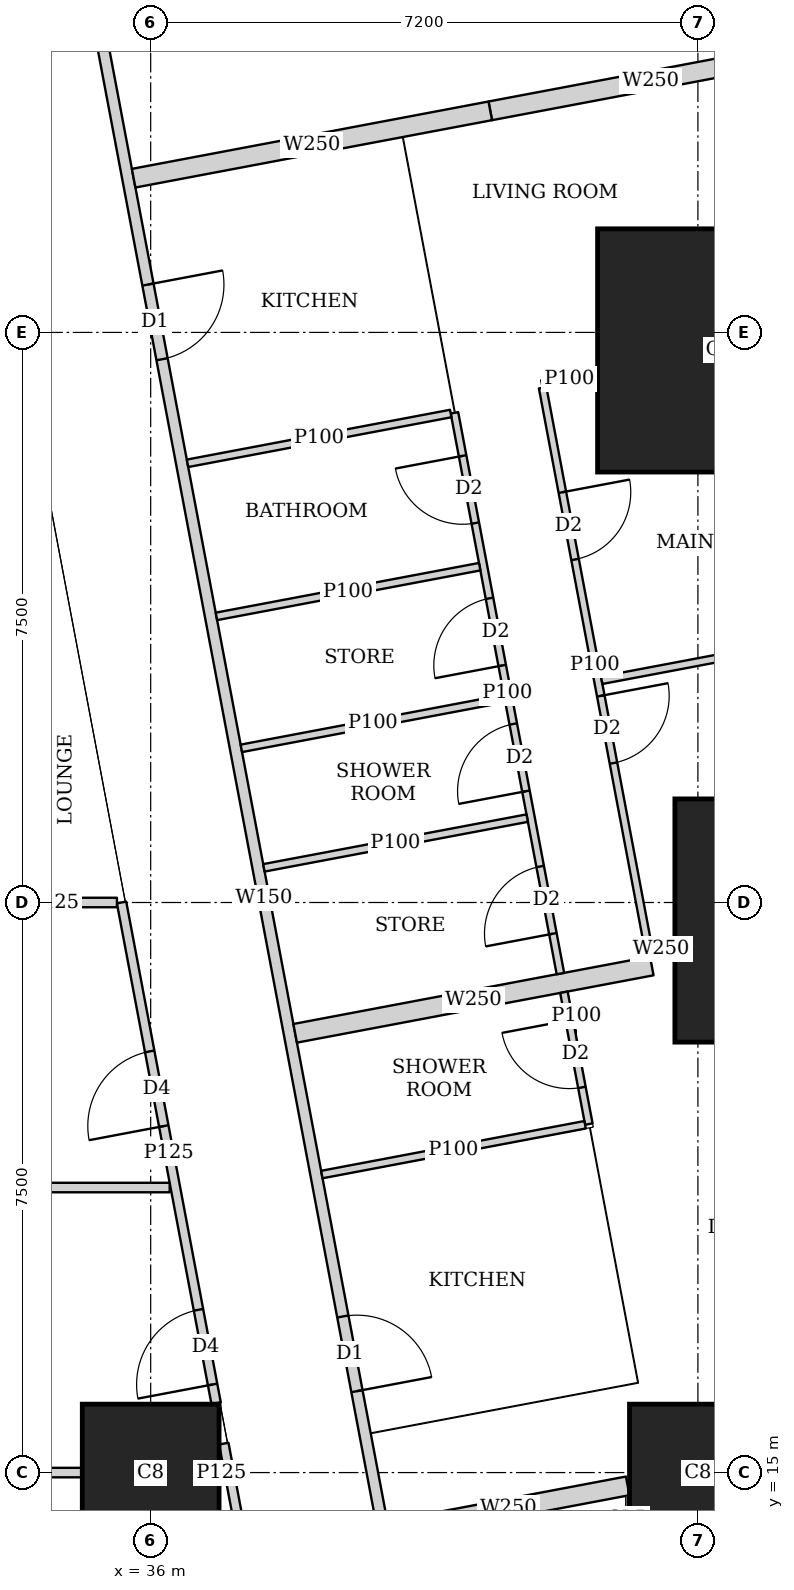
"""IFC4 building model, lengths in metres.
Left out: names, types, materials, properties, quantities, classifications, styles, units other than length and angle.
Written with IfcOpenShell. Run it as: python <this file> out.ifc"""

import sys

from ifc_helpers import new_model, si_unit, direction, frame, frame_2d, origin, origin_2d, place, context, subcontext, project, spatial, rectangle, extrude, element, fill, save


model = new_model("IFC4")
c1 = context("Model", 3, precision=1e-05, world=origin(), true_north=direction((0.0, 1.0)))
c2 = subcontext(c1, "Body", "Model", "MODEL_VIEW")
j1 = project(units=[si_unit("LENGTHUNIT", "METRE"), si_unit("PLANEANGLEUNIT", "RADIAN")], contexts=[c1])
p1 = place(None, origin())
s1 = spatial("IfcSite", under=j1, at=p1, CompositionType="ELEMENT")
p2 = place(p1, origin())
s2 = spatial("IfcBuilding", under=s1, at=p2, CompositionType="ELEMENT")
p3 = place(p2, frame((0.0, 0.0, 20.0)))
s3 = spatial("IfcBuildingStorey", under=s2, at=p3, CompositionType="ELEMENT", Elevation=20.0)
for number, where, z_axis, x_axis in (
    (1, (36.0, 15.0, 0.0), (0.0, 0.0, 1.0), (1.0, 0.0, 0.0)),
    (2, (43.2, 15.0, 0.0), (0.0, 0.0, 1.0), (1.0, 0.0, 0.0)),
):
    element("IfcColumn", number, at=place(p3, frame(where, z_axis=z_axis, x_axis=x_axis)), inside=s3, PredefinedType="COLUMN", context=c2, shape_type="SweptSolid", body=[
        extrude(rectangle(XDim=1.8, YDim=1.8, at=origin_2d()), origin(), (0.0, 0.0, 1.0), 3.75),
    ])
p4 = place(p3, frame((44.697, 22.263, 0.0), z_axis=(0.0, 0.0, 1.0), x_axis=(1.0, 0.0, 0.0)))
e3 = element("IfcColumn", 3, at=p4, inside=s3, PredefinedType="COLUMN", context=c2, shape_type="SweptSolid", body=[
    extrude(rectangle(XDim=3.6, YDim=3.2, at=origin_2d()), origin(), (0.0, 0.0, 1.0), 3.75),
])
p5 = place(p3, frame((43.48, 29.763, 0.0), z_axis=(0.0, 0.0, 1.0), x_axis=(1.0, 0.0, 0.0)))
e4 = element("IfcColumn", 4, at=p5, inside=s3, PredefinedType="COLUMN", context=c2, shape_type="SweptSolid", body=[
    extrude(rectangle(XDim=3.2, YDim=3.2, at=origin_2d()), origin(), (0.0, 0.0, 1.0), 3.75),
])
p6 = place(p3, frame((50.653, 2.703, 0.0), z_axis=(0.0, 0.0, 1.0), x_axis=(-0.185612026696, 0.982623109613, 0.0)))
e5 = element("IfcWall", 5, at=p6, inside=s3, PredefinedType="SOLIDWALL", context=c2, shape_type="SweptSolid", body=[
    extrude(rectangle(XDim=41.393, YDim=0.2, at=frame_2d((20.697, 0.0))), origin(), (0.0, 0.0, 1.0), 3.5),
])
p7 = place(p6, frame((1.633, 0.0, 0.9)))
e6 = element("IfcOpeningElement", 6, at=p7, cuts=e5, PredefinedType="OPENING", context=c2, shape_type="SweptSolid", body=[
    extrude(rectangle(XDim=1.8, YDim=1.5, at=frame_2d((0.9, 0.75))), frame((0.0, 0.11, 0.0), z_axis=(0.0, -1.0, 0.0), x_axis=(1.0, 0.0, 0.0)), (0.0, 0.0, 1.0), 0.22),
])
p8 = place(p6, frame((6.032, 0.0, 0.9)))
e7 = element("IfcOpeningElement", 7, at=p8, cuts=e5, PredefinedType="OPENING", context=c2, shape_type="SweptSolid", body=[
    extrude(rectangle(XDim=1.8, YDim=1.5, at=frame_2d((0.9, 0.75))), frame((0.0, 0.11, 0.0), z_axis=(0.0, -1.0, 0.0), x_axis=(1.0, 0.0, 0.0)), (0.0, 0.0, 1.0), 0.22),
])
p9 = place(p6, frame((9.848, 0.0, 0.9)))
e8 = element("IfcOpeningElement", 8, at=p9, cuts=e5, PredefinedType="OPENING", context=c2, shape_type="SweptSolid", body=[
    extrude(rectangle(XDim=1.8, YDim=1.5, at=frame_2d((0.9, 0.75))), frame((0.0, 0.11, 0.0), z_axis=(0.0, -1.0, 0.0), x_axis=(1.0, 0.0, 0.0)), (0.0, 0.0, 1.0), 0.22),
])
p10 = place(p6, frame((17.481, 0.0, 0.9)))
e9 = element("IfcOpeningElement", 9, at=p10, cuts=e5, PredefinedType="OPENING", context=c2, shape_type="SweptSolid", body=[
    extrude(rectangle(XDim=1.8, YDim=1.5, at=frame_2d((0.9, 0.75))), frame((0.0, 0.11, 0.0), z_axis=(0.0, -1.0, 0.0), x_axis=(1.0, 0.0, 0.0)), (0.0, 0.0, 1.0), 0.22),
])
p11 = place(p6, frame((21.297, 0.0, 0.9)))
e10 = element("IfcOpeningElement", 10, at=p11, cuts=e5, PredefinedType="OPENING", context=c2, shape_type="SweptSolid", body=[
    extrude(rectangle(XDim=1.8, YDim=1.5, at=frame_2d((0.9, 0.75))), frame((0.0, 0.11, 0.0), z_axis=(0.0, -1.0, 0.0), x_axis=(1.0, 0.0, 0.0)), (0.0, 0.0, 1.0), 0.22),
])
p12 = place(p6, frame((25.113, 0.0, 0.9)))
e11 = element("IfcOpeningElement", 11, at=p12, cuts=e5, PredefinedType="OPENING", context=c2, shape_type="SweptSolid", body=[
    extrude(rectangle(XDim=1.8, YDim=1.5, at=frame_2d((0.9, 0.75))), frame((0.0, 0.11, 0.0), z_axis=(0.0, -1.0, 0.0), x_axis=(1.0, 0.0, 0.0)), (0.0, 0.0, 1.0), 0.22),
])
p13 = place(p6, frame((28.93, 0.0, 0.9)))
e12 = element("IfcOpeningElement", 12, at=p13, cuts=e5, PredefinedType="OPENING", context=c2, shape_type="SweptSolid", body=[
    extrude(rectangle(XDim=1.8, YDim=1.5, at=frame_2d((0.9, 0.75))), frame((0.0, 0.11, 0.0), z_axis=(0.0, -1.0, 0.0), x_axis=(1.0, 0.0, 0.0)), (0.0, 0.0, 1.0), 0.22),
])
p14 = place(p6, frame((32.746, 0.0, 0.9)))
e13 = element("IfcOpeningElement", 13, at=p14, cuts=e5, PredefinedType="OPENING", context=c2, shape_type="SweptSolid", body=[
    extrude(rectangle(XDim=1.8, YDim=1.5, at=frame_2d((0.9, 0.75))), frame((0.0, 0.11, 0.0), z_axis=(0.0, -1.0, 0.0), x_axis=(1.0, 0.0, 0.0)), (0.0, 0.0, 1.0), 0.22),
])
p15 = place(p6, frame((36.481, 0.0, 0.9)))
e14 = element("IfcOpeningElement", 14, at=p15, cuts=e5, PredefinedType="OPENING", context=c2, shape_type="SweptSolid", body=[
    extrude(rectangle(XDim=1.8, YDim=1.5, at=frame_2d((0.9, 0.75))), frame((0.0, 0.11, 0.0), z_axis=(0.0, -1.0, 0.0), x_axis=(1.0, 0.0, 0.0)), (0.0, 0.0, 1.0), 0.22),
])
p16 = place(p3, frame((33.755, 42.325, 0.0), z_axis=(0.0, 0.0, 1.0), x_axis=(0.185611461091, -0.982623216453, 0.0)))
e15 = element("IfcWall", 15, at=p16, inside=s3, PredefinedType="SOLIDWALL", context=c2, shape_type="SweptSolid", body=[
    extrude(rectangle(XDim=40.241, YDim=0.15, at=frame_2d((20.121, 0.0))), origin(), (0.0, 0.0, 1.0), 2.5),
])
p17 = place(p16, frame((7.325, 0.0, 0.0)))
e16 = element("IfcOpeningElement", 16, at=p17, cuts=e15, PredefinedType="OPENING", context=c2, shape_type="SweptSolid", body=[
    extrude(rectangle(XDim=1.0, YDim=2.1, at=frame_2d((0.5, 1.05))), frame((0.0, 0.085, 0.0), z_axis=(0.0, -1.0, 0.0), x_axis=(1.0, 0.0, 0.0)), (0.0, 0.0, 1.0), 0.17),
])
p18 = place(p16, frame((11.902, 0.0, 0.0)))
e17 = element("IfcOpeningElement", 17, at=p18, cuts=e15, PredefinedType="OPENING", context=c2, shape_type="SweptSolid", body=[
    extrude(rectangle(XDim=1.0, YDim=2.1, at=frame_2d((0.5, 1.05))), frame((0.0, 0.085, 0.0), z_axis=(0.0, -1.0, 0.0), x_axis=(1.0, 0.0, 0.0)), (0.0, 0.0, 1.0), 0.17),
])
p19 = place(p16, frame((25.718, 0.0, 0.0)))
e18 = element("IfcOpeningElement", 18, at=p19, cuts=e15, PredefinedType="OPENING", context=c2, shape_type="SweptSolid", body=[
    extrude(rectangle(XDim=1.0, YDim=2.1, at=frame_2d((0.5, 1.05))), frame((0.0, 0.085, 0.0), z_axis=(0.0, -1.0, 0.0), x_axis=(1.0, 0.0, 0.0)), (0.0, 0.0, 1.0), 0.17),
])
p20 = place(p16, frame((31.788, 0.0, 0.0)))
e19 = element("IfcOpeningElement", 19, at=p20, cuts=e15, PredefinedType="OPENING", context=c2, shape_type="SweptSolid", body=[
    extrude(rectangle(XDim=1.0, YDim=2.1, at=frame_2d((0.5, 1.05))), frame((0.0, 0.085, 0.0), z_axis=(0.0, -1.0, 0.0), x_axis=(1.0, 0.0, 0.0)), (0.0, 0.0, 1.0), 0.17),
])
p21 = place(p3, frame((41.157, 29.273, 0.0), z_axis=(0.0, 0.0, 1.0), x_axis=(0.18542464283, -0.982658486877, 0.0)))
e20 = element("IfcWall", 20, at=p21, inside=s3, PredefinedType="PARTITIONING", context=c2, shape_type="SweptSolid", body=[
    extrude(rectangle(XDim=7.421, YDim=0.1, at=frame_2d((3.71, 0.0))), origin(), (0.0, 0.0, 1.0), 2.5),
])
p22 = place(p21, frame((1.4, 0.0, 0.0)))
e21 = element("IfcOpeningElement", 21, at=p22, cuts=e20, PredefinedType="OPENING", context=c2, shape_type="SweptSolid", body=[
    extrude(rectangle(XDim=0.9, YDim=2.1, at=frame_2d((0.45, 1.05))), frame((0.0, 0.06, 0.0), z_axis=(0.0, -1.0, 0.0), x_axis=(1.0, 0.0, 0.0)), (0.0, 0.0, 1.0), 0.12),
])
p23 = place(p21, frame((4.126, 0.0, 0.0)))
e22 = element("IfcOpeningElement", 22, at=p23, cuts=e20, PredefinedType="OPENING", context=c2, shape_type="SweptSolid", body=[
    extrude(rectangle(XDim=0.9, YDim=2.1, at=frame_2d((0.45, 1.05))), frame((0.0, 0.06, 0.0), z_axis=(0.0, -1.0, 0.0), x_axis=(1.0, 0.0, 0.0)), (0.0, 0.0, 1.0), 0.12),
])
p24 = place(p3, frame((39.997, 28.942, 0.0), z_axis=(0.0, 0.0, 1.0), x_axis=(0.185686318797, -0.982609073341, 0.0)))
e23 = element("IfcWall", 23, at=p24, inside=s3, PredefinedType="PARTITIONING", context=c2, shape_type="SweptSolid", body=[
    extrude(rectangle(XDim=7.508, YDim=0.1, at=frame_2d((3.754, 0.0))), origin(), (0.0, 0.0, 1.0), 2.5),
])
p25 = place(p24, frame((0.576, 0.0, 0.0)))
e24 = element("IfcOpeningElement", 24, at=p25, cuts=e23, PredefinedType="OPENING", context=c2, shape_type="SweptSolid", body=[
    extrude(rectangle(XDim=0.9, YDim=2.1, at=frame_2d((0.45, 1.05))), frame((0.0, 0.06, 0.0), z_axis=(0.0, -1.0, 0.0), x_axis=(1.0, 0.0, 0.0)), (0.0, 0.0, 1.0), 0.12),
])
p26 = place(p24, frame((4.166, 0.0, 0.0)))
e25 = element("IfcOpeningElement", 25, at=p26, cuts=e23, PredefinedType="OPENING", context=c2, shape_type="SweptSolid", body=[
    extrude(rectangle(XDim=0.9, YDim=2.1, at=frame_2d((0.45, 1.05))), frame((0.0, 0.06, 0.0), z_axis=(0.0, -1.0, 0.0), x_axis=(1.0, 0.0, 0.0)), (0.0, 0.0, 1.0), 0.12),
])
p27 = place(p24, frame((2.483, 0.0, 0.0)))
e26 = element("IfcOpeningElement", 26, at=p27, cuts=e23, PredefinedType="OPENING", context=c2, shape_type="SweptSolid", body=[
    extrude(rectangle(XDim=0.9, YDim=2.1, at=frame_2d((0.45, 1.05))), frame((0.0, 0.06, 0.0), z_axis=(0.0, -1.0, 0.0), x_axis=(1.0, 0.0, 0.0)), (0.0, 0.0, 1.0), 0.12),
])
p28 = place(p24, frame((6.074, 0.0, 0.0)))
e27 = element("IfcOpeningElement", 27, at=p28, cuts=e23, PredefinedType="OPENING", context=c2, shape_type="SweptSolid", body=[
    extrude(rectangle(XDim=0.9, YDim=2.1, at=frame_2d((0.45, 1.05))), frame((0.0, 0.06, 0.0), z_axis=(0.0, -1.0, 0.0), x_axis=(1.0, 0.0, 0.0)), (0.0, 0.0, 1.0), 0.12),
])
p29 = place(p3, frame((41.87, 29.459, 0.0), z_axis=(0.0, 0.0, 1.0), x_axis=(-0.982532562822, -0.186090738603, 0.0)))
e28 = element("IfcWall", 28, at=p29, inside=s3, PredefinedType="PARTITIONING", context=c2, shape_type="SweptSolid", body=[
    extrude(rectangle(XDim=0.736, YDim=0.1, at=frame_2d((0.368, 0.0))), origin(), (0.0, 0.0, 1.0), 2.5),
])
p30 = place(p3, frame((46.11, 26.213, 0.0), z_axis=(0.0, 0.0, 1.0), x_axis=(-0.982623519589, -0.185609856287, 0.0)))
e29 = element("IfcWall", 29, at=p30, inside=s3, PredefinedType="PARTITIONING", context=c2, shape_type="SweptSolid", body=[
    extrude(rectangle(XDim=4.25, YDim=0.1, at=frame_2d((2.125, 0.0))), origin(), (0.0, 0.0, 1.0), 2.05),
])
for number, where, z_axis, x_axis in (
    (30, (39.948, 28.933, 0.0), (0.0, 0.0, 1.0), (-0.983, -0.186, 0.0)),
    (31, (40.656, 25.183, 0.0), (0.0, 0.0, 1.0), (-0.983, -0.186, 0.0)),
):
    element("IfcWall", number, at=place(p3, frame(where, z_axis=z_axis, x_axis=x_axis)), inside=s3, PredefinedType="PARTITIONING", context=c2, shape_type="SweptSolid", body=[
        extrude(rectangle(XDim=3.524, YDim=0.1, at=frame_2d((1.762, 0.0))), origin(), (0.0, 0.0, 1.0), 3.5),
    ])
p31 = place(p3, frame((40.329, 26.918, 0.0), z_axis=(0.0, 0.0, 1.0), x_axis=(-0.982638553676, -0.185530247748, 0.0)))
e32 = element("IfcWall", 32, at=p31, inside=s3, PredefinedType="PARTITIONING", context=c2, shape_type="SweptSolid", body=[
    extrude(rectangle(XDim=3.525, YDim=0.1, at=frame_2d((1.763, 0.0))), origin(), (0.0, 0.0, 1.0), 3.5),
])
p32 = place(p3, frame((40.954, 23.61, 0.0), z_axis=(0.0, 0.0, 1.0), x_axis=(-0.982638553676, -0.185530247748, 0.0)))
e33 = element("IfcWall", 33, at=p32, inside=s3, PredefinedType="PARTITIONING", context=c2, shape_type="SweptSolid", body=[
    extrude(rectangle(XDim=3.525, YDim=0.1, at=frame_2d((1.763, 0.0))), origin(), (0.0, 0.0, 1.0), 2.5),
])
p33 = place(p3, frame((44.693, 33.713, 0.0), z_axis=(0.0, 0.0, 1.0), x_axis=(-0.982633535512, -0.185556823879, 0.0)))
e34 = element("IfcWall", 34, at=p33, inside=s3, PredefinedType="SOLIDWALL", context=c2, shape_type="SweptSolid", body=[
    extrude(rectangle(XDim=4.3, YDim=0.25, at=frame_2d((2.15, 0.0))), origin(), (0.0, 0.0, 1.0), 2.05),
])
p34 = place(p3, frame((40.468, 32.915, 0.0), z_axis=(0.0, 0.0, 1.0), x_axis=(-0.982635807605, -0.185544791394, 0.0)))
e35 = element("IfcWall", 35, at=p34, inside=s3, PredefinedType="SOLIDWALL", context=c2, shape_type="SweptSolid", body=[
    extrude(rectangle(XDim=4.775, YDim=0.25, at=frame_2d((2.388, 0.0))), origin(), (0.0, 0.0, 1.0), 3.5),
])
p35 = place(p3, frame((41.437, 21.319, 0.0), z_axis=(0.0, 0.0, 1.0), x_axis=(0.185783379659, -0.98259072652, 0.0)))
e36 = element("IfcWall", 36, at=p35, inside=s3, PredefinedType="PARTITIONING", context=c2, shape_type="SweptSolid", body=[
    extrude(rectangle(XDim=1.765, YDim=0.1, at=frame_2d((0.882, 0.0))), origin(), (0.0, 0.0, 1.0), 3.5),
])
p36 = place(p35, frame((0.374, 0.0, 0.0)))
e37 = element("IfcOpeningElement", 37, at=p36, cuts=e36, PredefinedType="OPENING", context=c2, shape_type="SweptSolid", body=[
    extrude(rectangle(XDim=0.9, YDim=2.1, at=frame_2d((0.45, 1.05))), frame((0.0, 0.06, 0.0), z_axis=(0.0, -1.0, 0.0), x_axis=(1.0, 0.0, 0.0)), (0.0, 0.0, 1.0), 0.12),
])
p37 = place(p3, frame((41.716, 19.576, 0.0), z_axis=(0.0, 0.0, 1.0), x_axis=(-0.982588017646, -0.185797706064, 0.0)))
e38 = element("IfcWall", 38, at=p37, inside=s3, PredefinedType="PARTITIONING", context=c2, shape_type="SweptSolid", body=[
    extrude(rectangle(XDim=3.525, YDim=0.1, at=frame_2d((1.763, 0.0))), origin(), (0.0, 0.0, 1.0), 3.5),
])
p38 = place(p3, frame((42.873, 21.918, 0.0), z_axis=(0.0, 0.0, 1.0), x_axis=(-0.982431406936, -0.186624035603, 0.0)))
e39 = element("IfcWall", 39, at=p38, inside=s3, PredefinedType="SOLIDWALL", context=c2, shape_type="SweptSolid", body=[
    extrude(rectangle(XDim=0.322, YDim=0.25, at=frame_2d((0.161, 0.0))), origin(), (0.0, 0.0, 1.0), 2.5),
])
p39 = place(p3, frame((42.593, 21.665, 0.0), z_axis=(0.0, 0.0, 1.0), x_axis=(-0.982635807605, -0.185544791394, 0.0)))
e40 = element("IfcWall", 40, at=p39, inside=s3, PredefinedType="SOLIDWALL", context=c2, shape_type="SweptSolid", body=[
    extrude(rectangle(XDim=4.775, YDim=0.25, at=frame_2d((2.388, 0.0))), origin(), (0.0, 0.0, 1.0), 2.5),
])
p40 = place(p3, frame((42.276, 14.825, 0.0), z_axis=(0.0, 0.0, 1.0), x_axis=(-0.982607211054, -0.185696173318, 0.0)))
e41 = element("IfcWall", 41, at=p40, inside=s3, PredefinedType="SOLIDWALL", context=c2, shape_type="SweptSolid", body=[
    extrude(rectangle(XDim=3.194, YDim=0.25, at=frame_2d((1.597, 0.0))), origin(), (0.0, 0.0, 1.0), 3.5),
])
p41 = place(p3, frame((37.9, 10.413, 0.0), z_axis=(0.0, 0.0, 1.0), x_axis=(-0.185527510388, 0.982639070508, 0.0)))
e42 = element("IfcWall", 42, at=p41, inside=s3, PredefinedType="PARTITIONING", context=c2, shape_type="SweptSolid", body=[
    extrude(rectangle(XDim=5.056, YDim=0.125, at=frame_2d((2.528, 0.0))), origin(), (0.0, 0.0, 1.0), 3.5),
])
p42 = place(p41, frame((0.708, 0.0, 0.0)))
e43 = element("IfcOpeningElement", 43, at=p42, cuts=e42, PredefinedType="OPENING", context=c2, shape_type="SweptSolid", body=[
    extrude(rectangle(XDim=1.0, YDim=2.1, at=frame_2d((0.5, 1.05))), frame((0.0, 0.073, 0.0), z_axis=(0.0, -1.0, 0.0), x_axis=(1.0, 0.0, 0.0)), (0.0, 0.0, 1.0), 0.145),
])
p43 = place(p3, frame((36.861, 15.913, 0.0), z_axis=(0.0, 0.0, 1.0), x_axis=(-0.185598960122, 0.982625577726, 0.0)))
e44 = element("IfcWall", 44, at=p43, inside=s3, PredefinedType="PARTITIONING", context=c2, shape_type="SweptSolid", body=[
    extrude(rectangle(XDim=6.703, YDim=0.125, at=frame_2d((3.352, 0.0))), origin(), (0.0, 0.0, 1.0), 2.5),
])
p44 = place(p43, frame((0.25, 0.0, 0.0)))
e45 = element("IfcOpeningElement", 45, at=p44, cuts=e44, PredefinedType="OPENING", context=c2, shape_type="SweptSolid", body=[
    extrude(rectangle(XDim=1.0, YDim=2.1, at=frame_2d((0.5, 1.05))), frame((0.0, 0.073, 0.0), z_axis=(0.0, -1.0, 0.0), x_axis=(1.0, 0.0, 0.0)), (0.0, 0.0, 1.0), 0.145),
])
p45 = place(p43, frame((3.71, 0.0, 0.0)))
e46 = element("IfcOpeningElement", 46, at=p45, cuts=e44, PredefinedType="OPENING", context=c2, shape_type="SweptSolid", body=[
    extrude(rectangle(XDim=1.0, YDim=2.1, at=frame_2d((0.5, 1.05))), frame((0.0, 0.073, 0.0), z_axis=(0.0, -1.0, 0.0), x_axis=(1.0, 0.0, 0.0)), (0.0, 0.0, 1.0), 0.145),
])
p46 = place(p3, frame((29.25, 15.0, 0.0), z_axis=(0.0, 0.0, 1.0), x_axis=(1.0, 0.0, 0.0)))
e47 = element("IfcWall", 47, at=p46, inside=s3, PredefinedType="PARTITIONING", context=c2, shape_type="SweptSolid", body=[
    extrude(rectangle(XDim=5.849, YDim=0.125, at=frame_2d((2.925, 0.0))), origin(), (0.0, 0.0, 1.0), 3.5),
])
p47 = place(p3, frame((36.901, 15.0, 0.0), z_axis=(0.0, 0.0, 1.0), x_axis=(1.0, 0.0, 0.0)))
e48 = element("IfcWall", 48, at=p47, inside=s3, PredefinedType="PARTITIONING", context=c2, shape_type="SweptSolid", body=[
    extrude(rectangle(XDim=0.057, YDim=0.125, at=frame_2d((0.029, 0.0))), origin(), (0.0, 0.0, 1.0), 3.5),
])
p48 = place(p3, frame((29.25, 18.75, 0.0), z_axis=(0.0, 0.0, 1.0), x_axis=(1.0, 0.0, 0.0)))
e49 = element("IfcWall", 49, at=p48, inside=s3, PredefinedType="PARTITIONING", context=c2, shape_type="SweptSolid", body=[
    extrude(rectangle(XDim=7.0, YDim=0.125, at=frame_2d((3.5, 0.0))), origin(), (0.0, 0.0, 1.0), 3.5),
])
p49 = place(p3, frame((33.901, 22.5, 0.0), z_axis=(0.0, 0.0, 1.0), x_axis=(1.0, 0.0, 0.0)))
e50 = element("IfcWall", 50, at=p49, inside=s3, PredefinedType="PARTITIONING", context=c2, shape_type="SweptSolid", body=[
    extrude(rectangle(XDim=1.655, YDim=0.125, at=frame_2d((0.828, 0.0))), origin(), (0.0, 0.0, 1.0), 2.5),
])
p50 = place(p22, origin())
e51 = element("IfcDoor", 51, at=p50, inside=s3, OperationType="SINGLE_SWING_LEFT", PredefinedType="DOOR", context=c2, shape_type="SweptSolid", body=[
    extrude(rectangle(XDim=0.9, YDim=2.1, at=frame_2d((0.45, 1.05))), frame((0.0, 0.025, 0.0), z_axis=(0.0, -1.0, 0.0), x_axis=(1.0, 0.0, 0.0)), (0.0, 0.0, 1.0), 0.05),
])
fill(e21, e51)
p51 = place(p23, origin())
e52 = element("IfcDoor", 52, at=p51, inside=s3, OperationType="SINGLE_SWING_LEFT", PredefinedType="DOOR", context=c2, shape_type="SweptSolid", body=[
    extrude(rectangle(XDim=0.9, YDim=2.1, at=frame_2d((0.45, 1.05))), frame((0.0, 0.025, 0.0), z_axis=(0.0, -1.0, 0.0), x_axis=(1.0, 0.0, 0.0)), (0.0, 0.0, 1.0), 0.05),
])
fill(e22, e52)
p52 = place(p25, origin())
e53 = element("IfcDoor", 53, at=p52, inside=s3, OperationType="SINGLE_SWING_RIGHT", PredefinedType="DOOR", context=c2, shape_type="SweptSolid", body=[
    extrude(rectangle(XDim=0.9, YDim=2.1, at=frame_2d((0.45, 1.05))), frame((0.0, 0.025, 0.0), z_axis=(0.0, -1.0, 0.0), x_axis=(1.0, 0.0, 0.0)), (0.0, 0.0, 1.0), 0.05),
])
fill(e24, e53)
p53 = place(p26, origin())
e54 = element("IfcDoor", 54, at=p53, inside=s3, OperationType="SINGLE_SWING_LEFT", PredefinedType="DOOR", context=c2, shape_type="SweptSolid", body=[
    extrude(rectangle(XDim=0.9, YDim=2.1, at=frame_2d((0.45, 1.05))), frame((0.0, 0.025, 0.0), z_axis=(0.0, -1.0, 0.0), x_axis=(1.0, 0.0, 0.0)), (0.0, 0.0, 1.0), 0.05),
])
fill(e25, e54)
p54 = place(p27, origin())
e55 = element("IfcDoor", 55, at=p54, inside=s3, OperationType="SINGLE_SWING_LEFT", PredefinedType="DOOR", context=c2, shape_type="SweptSolid", body=[
    extrude(rectangle(XDim=0.9, YDim=2.1, at=frame_2d((0.45, 1.05))), frame((0.0, 0.025, 0.0), z_axis=(0.0, -1.0, 0.0), x_axis=(1.0, 0.0, 0.0)), (0.0, 0.0, 1.0), 0.05),
])
fill(e26, e55)
p55 = place(p28, origin())
e56 = element("IfcDoor", 56, at=p55, inside=s3, OperationType="SINGLE_SWING_LEFT", PredefinedType="DOOR", context=c2, shape_type="SweptSolid", body=[
    extrude(rectangle(XDim=0.9, YDim=2.1, at=frame_2d((0.45, 1.05))), frame((0.0, 0.025, 0.0), z_axis=(0.0, -1.0, 0.0), x_axis=(1.0, 0.0, 0.0)), (0.0, 0.0, 1.0), 0.05),
])
fill(e27, e56)
p56 = place(p18, origin())
e57 = element("IfcDoor", 57, at=p56, inside=s3, OperationType="SINGLE_SWING_LEFT", PredefinedType="DOOR", context=c2, shape_type="SweptSolid", body=[
    extrude(rectangle(XDim=1.0, YDim=2.1, at=frame_2d((0.5, 1.05))), frame((0.0, 0.025, 0.0), z_axis=(0.0, -1.0, 0.0), x_axis=(1.0, 0.0, 0.0)), (0.0, 0.0, 1.0), 0.05),
])
fill(e17, e57)
p57 = place(p36, origin())
e58 = element("IfcDoor", 58, at=p57, inside=s3, OperationType="SINGLE_SWING_RIGHT", PredefinedType="DOOR", context=c2, shape_type="SweptSolid", body=[
    extrude(rectangle(XDim=0.9, YDim=2.1, at=frame_2d((0.45, 1.05))), frame((0.0, 0.025, 0.0), z_axis=(0.0, -1.0, 0.0), x_axis=(1.0, 0.0, 0.0)), (0.0, 0.0, 1.0), 0.05),
])
fill(e37, e58)
p58 = place(p19, origin())
e59 = element("IfcDoor", 59, at=p58, inside=s3, OperationType="SINGLE_SWING_RIGHT", PredefinedType="DOOR", context=c2, shape_type="SweptSolid", body=[
    extrude(rectangle(XDim=1.0, YDim=2.1, at=frame_2d((0.5, 1.05))), frame((0.0, 0.025, 0.0), z_axis=(0.0, -1.0, 0.0), x_axis=(1.0, 0.0, 0.0)), (0.0, 0.0, 1.0), 0.05),
])
fill(e18, e59)
p59 = place(p44, origin())
e60 = element("IfcDoor", 60, at=p59, inside=s3, OperationType="SINGLE_SWING_LEFT", PredefinedType="DOOR", context=c2, shape_type="SweptSolid", body=[
    extrude(rectangle(XDim=1.0, YDim=2.1, at=frame_2d((0.5, 1.05))), frame((0.0, 0.025, 0.0), z_axis=(0.0, -1.0, 0.0), x_axis=(1.0, 0.0, 0.0)), (0.0, 0.0, 1.0), 0.05),
])
fill(e45, e60)
p60 = place(p45, origin())
e61 = element("IfcDoor", 61, at=p60, inside=s3, OperationType="SINGLE_SWING_LEFT", PredefinedType="DOOR", context=c2, shape_type="SweptSolid", body=[
    extrude(rectangle(XDim=1.0, YDim=2.1, at=frame_2d((0.5, 1.05))), frame((0.0, 0.025, 0.0), z_axis=(0.0, -1.0, 0.0), x_axis=(1.0, 0.0, 0.0)), (0.0, 0.0, 1.0), 0.05),
])
fill(e46, e61)
save(model, sys.argv[1])
